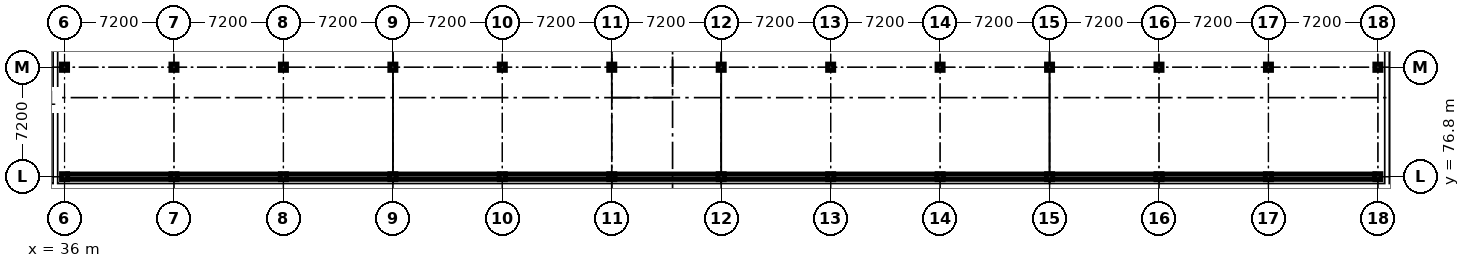
"""IFC4 building model, lengths in metres.
Left out: names, types, materials, properties, quantities, classifications, styles, units other than length and angle.
Written with IfcOpenShell. Run it as: python <this file> out.ifc"""

import sys

from ifc_helpers import new_model, si_unit, direction, frame, frame_2d, origin, origin_2d, place, context, subcontext, project, spatial, rectangle, i_section, extrude, element, save


model = new_model("IFC4")
c1 = context("Model", 3, precision=1e-05, world=origin(), true_north=direction((0.0, 1.0)))
c2 = subcontext(c1, "Body", "Model", "MODEL_VIEW")
j1 = project(units=[si_unit("LENGTHUNIT", "METRE"), si_unit("PLANEANGLEUNIT", "RADIAN")], contexts=[c1])
p1 = place(None, origin())
s1 = spatial("IfcSite", under=j1, at=p1, CompositionType="ELEMENT")
p2 = place(p1, origin())
s2 = spatial("IfcBuilding", under=s1, at=p2, CompositionType="ELEMENT")
p3 = place(p2, frame((0.0, 0.0, -4.5)))
s3 = spatial("IfcBuildingStorey", under=s2, at=p3, CompositionType="ELEMENT", Elevation=-4.5)
p4 = place(p3, frame((36.0, 76.8, 0.0), z_axis=(0.0, 0.0, 1.0), x_axis=(1.0, 0.0, 0.0)))
e1 = element("IfcColumn", 1, at=p4, inside=s3, PredefinedType="COLUMN", context=c2, shape_type="SweptSolid", body=[
    extrude(i_section(OverallWidth=0.404, OverallDepth=0.406, WebThickness=0.027, FlangeThickness=0.044, FilletRadius=0.015, at=origin_2d()), origin(), (0.0, 0.0, 1.0), 4.5),
])
p5 = place(p3, frame((36.0, 84.0, 0.0), z_axis=(0.0, 0.0, 1.0), x_axis=(1.0, 0.0, 0.0)))
e2 = element("IfcColumn", 2, at=p5, inside=s3, PredefinedType="COLUMN", context=c2, shape_type="SweptSolid", body=[
    extrude(i_section(OverallWidth=0.409, OverallDepth=0.424, WebThickness=0.033, FlangeThickness=0.052, FilletRadius=0.015, at=origin_2d()), origin(), (0.0, 0.0, 1.0), 4.5),
])
p6 = place(p3, frame((43.2, 76.8, 0.0), z_axis=(0.0, 0.0, 1.0), x_axis=(1.0, 0.0, 0.0)))
e3 = element("IfcColumn", 3, at=p6, inside=s3, PredefinedType="COLUMN", context=c2, shape_type="SweptSolid", body=[
    extrude(i_section(OverallWidth=0.404, OverallDepth=0.406, WebThickness=0.027, FlangeThickness=0.044, FilletRadius=0.015, at=origin_2d()), origin(), (0.0, 0.0, 1.0), 4.5),
])
p7 = place(p3, frame((43.2, 84.0, 0.0), z_axis=(0.0, 0.0, 1.0), x_axis=(1.0, 0.0, 0.0)))
e4 = element("IfcColumn", 4, at=p7, inside=s3, PredefinedType="COLUMN", context=c2, shape_type="SweptSolid", body=[
    extrude(i_section(OverallWidth=0.409, OverallDepth=0.424, WebThickness=0.033, FlangeThickness=0.052, FilletRadius=0.015, at=origin_2d()), origin(), (0.0, 0.0, 1.0), 4.5),
])
p8 = place(p3, frame((50.4, 76.8, 0.0), z_axis=(0.0, 0.0, 1.0), x_axis=(1.0, 0.0, 0.0)))
e5 = element("IfcColumn", 5, at=p8, inside=s3, PredefinedType="COLUMN", context=c2, shape_type="SweptSolid", body=[
    extrude(i_section(OverallWidth=0.404, OverallDepth=0.406, WebThickness=0.027, FlangeThickness=0.044, FilletRadius=0.015, at=origin_2d()), origin(), (0.0, 0.0, 1.0), 4.5),
])
p9 = place(p3, frame((50.4, 84.0, 0.0), z_axis=(0.0, 0.0, 1.0), x_axis=(1.0, 0.0, 0.0)))
e6 = element("IfcColumn", 6, at=p9, inside=s3, PredefinedType="COLUMN", context=c2, shape_type="SweptSolid", body=[
    extrude(i_section(OverallWidth=0.409, OverallDepth=0.424, WebThickness=0.033, FlangeThickness=0.052, FilletRadius=0.015, at=origin_2d()), origin(), (0.0, 0.0, 1.0), 4.5),
])
p10 = place(p3, frame((57.6, 76.8, 0.0), z_axis=(0.0, 0.0, 1.0), x_axis=(1.0, 0.0, 0.0)))
e7 = element("IfcColumn", 7, at=p10, inside=s3, PredefinedType="COLUMN", context=c2, shape_type="SweptSolid", body=[
    extrude(i_section(OverallWidth=0.404, OverallDepth=0.406, WebThickness=0.027, FlangeThickness=0.044, FilletRadius=0.015, at=origin_2d()), origin(), (0.0, 0.0, 1.0), 4.5),
])
p11 = place(p3, frame((57.6, 84.0, 0.0), z_axis=(0.0, 0.0, 1.0), x_axis=(1.0, 0.0, 0.0)))
e8 = element("IfcColumn", 8, at=p11, inside=s3, PredefinedType="COLUMN", context=c2, shape_type="SweptSolid", body=[
    extrude(i_section(OverallWidth=0.409, OverallDepth=0.424, WebThickness=0.033, FlangeThickness=0.052, FilletRadius=0.015, at=origin_2d()), origin(), (0.0, 0.0, 1.0), 4.5),
])
p12 = place(p3, frame((64.8, 76.8, 0.0), z_axis=(0.0, 0.0, 1.0), x_axis=(1.0, 0.0, 0.0)))
e9 = element("IfcColumn", 9, at=p12, inside=s3, PredefinedType="COLUMN", context=c2, shape_type="SweptSolid", body=[
    extrude(i_section(OverallWidth=0.404, OverallDepth=0.406, WebThickness=0.027, FlangeThickness=0.044, FilletRadius=0.015, at=origin_2d()), origin(), (0.0, 0.0, 1.0), 4.5),
])
p13 = place(p3, frame((64.8, 84.0, 0.0), z_axis=(0.0, 0.0, 1.0), x_axis=(1.0, 0.0, 0.0)))
e10 = element("IfcColumn", 10, at=p13, inside=s3, PredefinedType="COLUMN", context=c2, shape_type="SweptSolid", body=[
    extrude(i_section(OverallWidth=0.409, OverallDepth=0.424, WebThickness=0.033, FlangeThickness=0.052, FilletRadius=0.015, at=origin_2d()), origin(), (0.0, 0.0, 1.0), 4.5),
])
p14 = place(p3, frame((72.0, 76.8, 0.0), z_axis=(0.0, 0.0, 1.0), x_axis=(1.0, 0.0, 0.0)))
e11 = element("IfcColumn", 11, at=p14, inside=s3, PredefinedType="COLUMN", context=c2, shape_type="SweptSolid", body=[
    extrude(i_section(OverallWidth=0.404, OverallDepth=0.406, WebThickness=0.027, FlangeThickness=0.044, FilletRadius=0.015, at=origin_2d()), origin(), (0.0, 0.0, 1.0), 4.5),
])
p15 = place(p3, frame((72.0, 84.0, 0.0), z_axis=(0.0, 0.0, 1.0), x_axis=(1.0, 0.0, 0.0)))
e12 = element("IfcColumn", 12, at=p15, inside=s3, PredefinedType="COLUMN", context=c2, shape_type="SweptSolid", body=[
    extrude(i_section(OverallWidth=0.409, OverallDepth=0.424, WebThickness=0.033, FlangeThickness=0.052, FilletRadius=0.015, at=origin_2d()), origin(), (0.0, 0.0, 1.0), 4.5),
])
p16 = place(p3, frame((79.2, 76.8, 0.0), z_axis=(0.0, 0.0, 1.0), x_axis=(1.0, 0.0, 0.0)))
e13 = element("IfcColumn", 13, at=p16, inside=s3, PredefinedType="COLUMN", context=c2, shape_type="SweptSolid", body=[
    extrude(i_section(OverallWidth=0.404, OverallDepth=0.406, WebThickness=0.027, FlangeThickness=0.044, FilletRadius=0.015, at=origin_2d()), origin(), (0.0, 0.0, 1.0), 4.5),
])
p17 = place(p3, frame((79.2, 84.0, 0.0), z_axis=(0.0, 0.0, 1.0), x_axis=(1.0, 0.0, 0.0)))
e14 = element("IfcColumn", 14, at=p17, inside=s3, PredefinedType="COLUMN", context=c2, shape_type="SweptSolid", body=[
    extrude(i_section(OverallWidth=0.409, OverallDepth=0.424, WebThickness=0.033, FlangeThickness=0.052, FilletRadius=0.015, at=origin_2d()), origin(), (0.0, 0.0, 1.0), 4.5),
])
p18 = place(p3, frame((86.4, 76.8, 0.0), z_axis=(0.0, 0.0, 1.0), x_axis=(1.0, 0.0, 0.0)))
e15 = element("IfcColumn", 15, at=p18, inside=s3, PredefinedType="COLUMN", context=c2, shape_type="SweptSolid", body=[
    extrude(i_section(OverallWidth=0.404, OverallDepth=0.406, WebThickness=0.027, FlangeThickness=0.044, FilletRadius=0.015, at=origin_2d()), origin(), (0.0, 0.0, 1.0), 4.5),
])
p19 = place(p3, frame((86.4, 84.0, 0.0), z_axis=(0.0, 0.0, 1.0), x_axis=(1.0, 0.0, 0.0)))
e16 = element("IfcColumn", 16, at=p19, inside=s3, PredefinedType="COLUMN", context=c2, shape_type="SweptSolid", body=[
    extrude(i_section(OverallWidth=0.409, OverallDepth=0.424, WebThickness=0.033, FlangeThickness=0.052, FilletRadius=0.015, at=origin_2d()), origin(), (0.0, 0.0, 1.0), 4.5),
])
p20 = place(p3, frame((93.6, 76.8, 0.0), z_axis=(0.0, 0.0, 1.0), x_axis=(1.0, 0.0, 0.0)))
e17 = element("IfcColumn", 17, at=p20, inside=s3, PredefinedType="COLUMN", context=c2, shape_type="SweptSolid", body=[
    extrude(i_section(OverallWidth=0.404, OverallDepth=0.406, WebThickness=0.027, FlangeThickness=0.044, FilletRadius=0.015, at=origin_2d()), origin(), (0.0, 0.0, 1.0), 4.5),
])
p21 = place(p3, frame((93.6, 84.0, 0.0), z_axis=(0.0, 0.0, 1.0), x_axis=(1.0, 0.0, 0.0)))
e18 = element("IfcColumn", 18, at=p21, inside=s3, PredefinedType="COLUMN", context=c2, shape_type="SweptSolid", body=[
    extrude(i_section(OverallWidth=0.409, OverallDepth=0.424, WebThickness=0.033, FlangeThickness=0.052, FilletRadius=0.015, at=origin_2d()), origin(), (0.0, 0.0, 1.0), 4.5),
])
p22 = place(p3, frame((100.8, 76.8, 0.0), z_axis=(0.0, 0.0, 1.0), x_axis=(1.0, 0.0, 0.0)))
e19 = element("IfcColumn", 19, at=p22, inside=s3, PredefinedType="COLUMN", context=c2, shape_type="SweptSolid", body=[
    extrude(i_section(OverallWidth=0.404, OverallDepth=0.406, WebThickness=0.027, FlangeThickness=0.044, FilletRadius=0.015, at=origin_2d()), origin(), (0.0, 0.0, 1.0), 4.5),
])
p23 = place(p3, frame((100.8, 84.0, 0.0), z_axis=(0.0, 0.0, 1.0), x_axis=(1.0, 0.0, 0.0)))
e20 = element("IfcColumn", 20, at=p23, inside=s3, PredefinedType="COLUMN", context=c2, shape_type="SweptSolid", body=[
    extrude(i_section(OverallWidth=0.409, OverallDepth=0.424, WebThickness=0.033, FlangeThickness=0.052, FilletRadius=0.015, at=origin_2d()), origin(), (0.0, 0.0, 1.0), 4.5),
])
p24 = place(p3, frame((108.0, 76.8, 0.0), z_axis=(0.0, 0.0, 1.0), x_axis=(1.0, 0.0, 0.0)))
e21 = element("IfcColumn", 21, at=p24, inside=s3, PredefinedType="COLUMN", context=c2, shape_type="SweptSolid", body=[
    extrude(i_section(OverallWidth=0.404, OverallDepth=0.406, WebThickness=0.027, FlangeThickness=0.044, FilletRadius=0.015, at=origin_2d()), origin(), (0.0, 0.0, 1.0), 4.5),
])
p25 = place(p3, frame((108.0, 84.0, 0.0), z_axis=(0.0, 0.0, 1.0), x_axis=(1.0, 0.0, 0.0)))
e22 = element("IfcColumn", 22, at=p25, inside=s3, PredefinedType="COLUMN", context=c2, shape_type="SweptSolid", body=[
    extrude(i_section(OverallWidth=0.409, OverallDepth=0.424, WebThickness=0.033, FlangeThickness=0.052, FilletRadius=0.015, at=origin_2d()), origin(), (0.0, 0.0, 1.0), 4.5),
])
p26 = place(p3, frame((115.2, 76.8, 0.0), z_axis=(0.0, 0.0, 1.0), x_axis=(1.0, 0.0, 0.0)))
e23 = element("IfcColumn", 23, at=p26, inside=s3, PredefinedType="COLUMN", context=c2, shape_type="SweptSolid", body=[
    extrude(i_section(OverallWidth=0.404, OverallDepth=0.406, WebThickness=0.027, FlangeThickness=0.044, FilletRadius=0.015, at=origin_2d()), origin(), (0.0, 0.0, 1.0), 4.5),
])
p27 = place(p3, frame((115.2, 84.0, 0.0), z_axis=(0.0, 0.0, 1.0), x_axis=(1.0, 0.0, 0.0)))
e24 = element("IfcColumn", 24, at=p27, inside=s3, PredefinedType="COLUMN", context=c2, shape_type="SweptSolid", body=[
    extrude(i_section(OverallWidth=0.409, OverallDepth=0.424, WebThickness=0.033, FlangeThickness=0.052, FilletRadius=0.015, at=origin_2d()), origin(), (0.0, 0.0, 1.0), 4.5),
])
p28 = place(p3, frame((122.4, 76.8, 0.0), z_axis=(0.0, 0.0, 1.0), x_axis=(1.0, 0.0, 0.0)))
e25 = element("IfcColumn", 25, at=p28, inside=s3, PredefinedType="COLUMN", context=c2, shape_type="SweptSolid", body=[
    extrude(i_section(OverallWidth=0.404, OverallDepth=0.406, WebThickness=0.027, FlangeThickness=0.044, FilletRadius=0.015, at=origin_2d()), origin(), (0.0, 0.0, 1.0), 4.5),
])
p29 = place(p3, frame((122.4, 84.0, 0.0), z_axis=(0.0, 0.0, 1.0), x_axis=(1.0, 0.0, 0.0)))
e26 = element("IfcColumn", 26, at=p29, inside=s3, PredefinedType="COLUMN", context=c2, shape_type="SweptSolid", body=[
    extrude(i_section(OverallWidth=0.409, OverallDepth=0.424, WebThickness=0.033, FlangeThickness=0.052, FilletRadius=0.015, at=origin_2d()), origin(), (0.0, 0.0, 1.0), 4.5),
])
for number, where, z_axis, x_axis in (
    (27, (42.991, 76.8, 0.0), (0.0, 0.0, 1.0), (-1.0, 0.0, 0.0)),
    (28, (50.191, 76.8, 0.0), (0.0, 0.0, 1.0), (-1.0, 0.0, 0.0)),
):
    element("IfcWall", number, at=place(p3, frame(where, z_axis=z_axis, x_axis=x_axis)), inside=s3, PredefinedType="SOLIDWALL", context=c2, shape_type="SweptSolid", body=[
        extrude(rectangle(XDim=6.782, YDim=0.36, at=frame_2d((3.391, 0.0))), origin(), (0.0, 0.0, 1.0), 3.448),
    ])
p30 = place(p3, frame((57.391, 76.8, 0.0), z_axis=(0.0, 0.0, 1.0), x_axis=(-1.0, 0.0, 0.0)))
e29 = element("IfcWall", 29, at=p30, inside=s3, PredefinedType="SOLIDWALL", context=c2, shape_type="SweptSolid", body=[
    extrude(rectangle(XDim=6.782, YDim=0.36, at=frame_2d((3.391, 0.0))), origin(), (0.0, 0.0, 1.0), 3.448),
])
for number, where, z_axis, x_axis in (
    (30, (64.591, 76.8, 0.0), (0.0, 0.0, 1.0), (-1.0, 0.0, 0.0)),
    (31, (71.791, 76.8, 0.0), (0.0, 0.0, 1.0), (-1.0, 0.0, 0.0)),
    (32, (78.991, 76.8, 0.0), (0.0, 0.0, 1.0), (-1.0, 0.0, 0.0)),
    (33, (86.191, 76.8, 0.0), (0.0, 0.0, 1.0), (-1.0, 0.0, 0.0)),
):
    element("IfcWall", number, at=place(p3, frame(where, z_axis=z_axis, x_axis=x_axis)), inside=s3, PredefinedType="SOLIDWALL", context=c2, shape_type="SweptSolid", body=[
        extrude(rectangle(XDim=6.782, YDim=0.36, at=frame_2d((3.391, 0.0))), origin(), (0.0, 0.0, 1.0), 3.448),
    ])
p31 = place(p3, frame((93.391, 76.8, 0.0), z_axis=(0.0, 0.0, 1.0), x_axis=(-1.0, 0.0, 0.0)))
e34 = element("IfcWall", 34, at=p31, inside=s3, PredefinedType="SOLIDWALL", context=c2, shape_type="SweptSolid", body=[
    extrude(rectangle(XDim=6.782, YDim=0.36, at=frame_2d((3.391, 0.0))), origin(), (0.0, 0.0, 1.0), 3.448),
])
for number, where, z_axis, x_axis in (
    (35, (100.591, 76.8, 0.0), (0.0, 0.0, 1.0), (-1.0, 0.0, 0.0)),
    (36, (107.791, 76.8, 0.0), (0.0, 0.0, 1.0), (-1.0, 0.0, 0.0)),
    (37, (114.991, 76.8, 0.0), (0.0, 0.0, 1.0), (-1.0, 0.0, 0.0)),
    (38, (122.191, 76.8, 0.0), (0.0, 0.0, 1.0), (-1.0, 0.0, 0.0)),
):
    element("IfcWall", number, at=place(p3, frame(where, z_axis=z_axis, x_axis=x_axis)), inside=s3, PredefinedType="SOLIDWALL", context=c2, shape_type="SweptSolid", body=[
        extrude(rectangle(XDim=6.782, YDim=0.36, at=frame_2d((3.391, 0.0))), origin(), (0.0, 0.0, 1.0), 3.448),
    ])
save(model, sys.argv[1])
